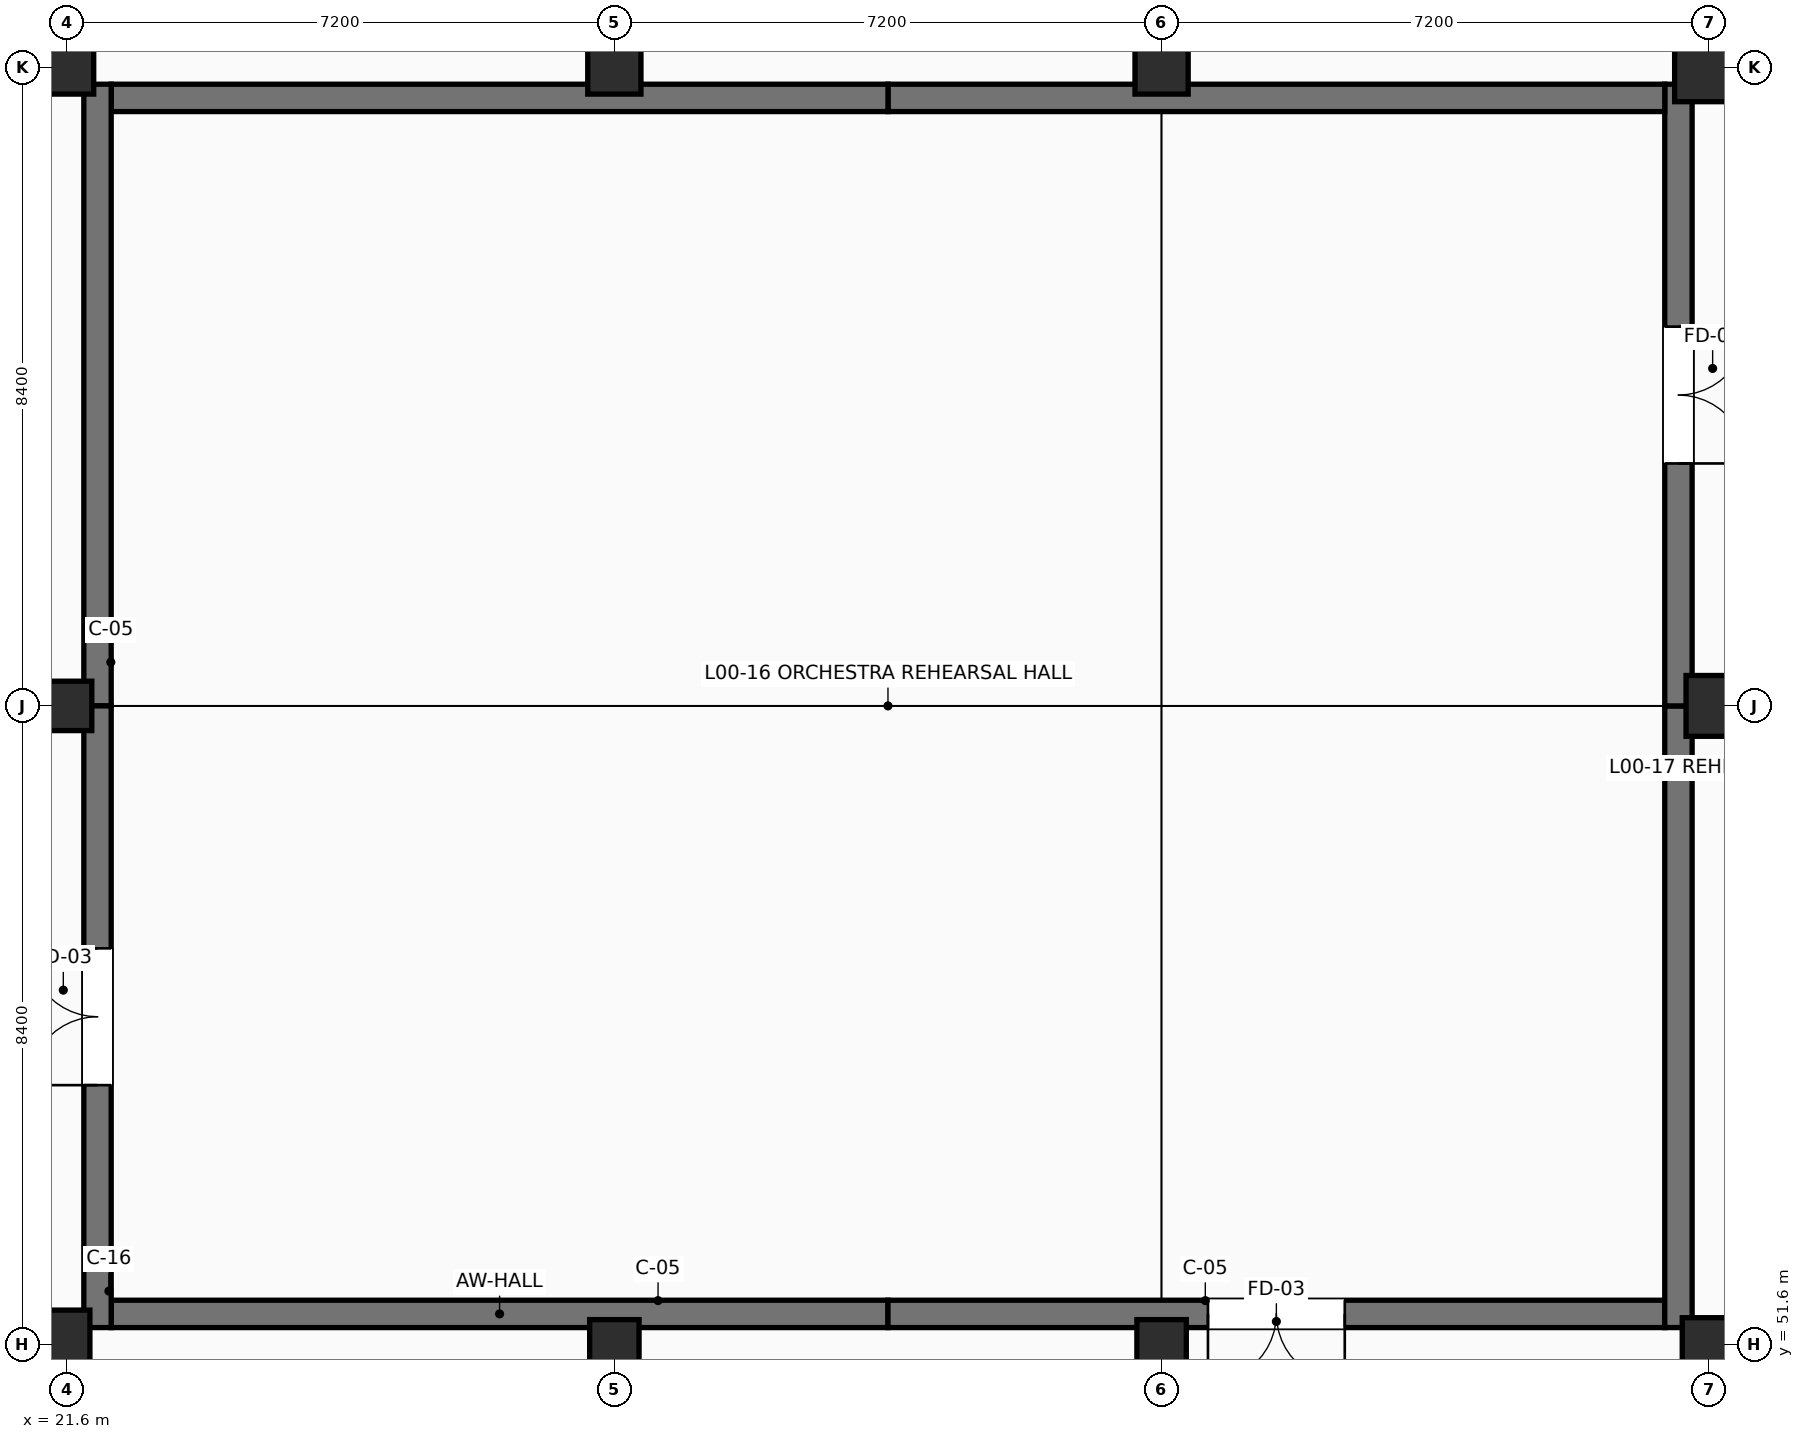
"""IFC4 building model, lengths in metres.
Left out: names, types, materials, properties, quantities, classifications, styles, units other than length and angle.
Written with IfcOpenShell. Run it as: python <this file> out.ifc"""

import sys

from ifc_helpers import new_model, si_unit, direction, frame, frame_2d, origin, origin_2d, place, context, subcontext, project, spatial, rectangle, extrude, element, fill, save


model = new_model("IFC4")
c1 = context("Model", 3, precision=1e-05, world=origin(), true_north=direction((0.0, 1.0)))
c2 = subcontext(c1, "Body", "Model", "MODEL_VIEW")
j1 = project(units=[si_unit("LENGTHUNIT", "METRE"), si_unit("PLANEANGLEUNIT", "RADIAN")], contexts=[c1])
p1 = place(None, origin())
s1 = spatial("IfcSite", under=j1, at=p1, CompositionType="ELEMENT")
p2 = place(p1, origin())
s2 = spatial("IfcBuilding", under=s1, at=p2, CompositionType="ELEMENT")
p3 = place(p2, origin())
s3 = spatial("IfcBuildingStorey", under=s2, at=p3, CompositionType="ELEMENT", Elevation=0.0)
p4 = place(p3, frame((21.6, 51.6, 0.0), z_axis=(0.0, 0.0, 1.0), x_axis=(1.0, 0.0, 0.0)))
e1 = element("IfcColumn", 1, at=p4, inside=s3, PredefinedType="COLUMN", context=c2, shape_type="SweptSolid", body=[
    extrude(rectangle(XDim=0.6, YDim=0.9, at=origin_2d()), origin(), (0.0, 0.0, 1.0), 4.8),
])
p5 = place(p3, frame((21.6, 60.0, 0.0), z_axis=(0.0, 0.0, 1.0), x_axis=(1.0, 0.0, 0.0)))
e2 = element("IfcColumn", 2, at=p5, inside=s3, PredefinedType="COLUMN", context=c2, shape_type="SweptSolid", body=[
    extrude(rectangle(XDim=0.65, YDim=0.65, at=origin_2d()), origin(), (0.0, 0.0, 1.0), 4.8),
])
p6 = place(p3, frame((21.6, 68.4, 0.0), z_axis=(0.0, 0.0, 1.0), x_axis=(1.0, 0.0, 0.0)))
e3 = element("IfcColumn", 3, at=p6, inside=s3, PredefinedType="COLUMN", context=c2, shape_type="SweptSolid", body=[
    extrude(rectangle(XDim=0.7, YDim=0.7, at=origin_2d()), origin(), (0.0, 0.0, 1.0), 4.8),
])
p7 = place(p3, frame((28.8, 51.6, 0.0), z_axis=(0.0, 0.0, 1.0), x_axis=(1.0, 0.0, 0.0)))
e4 = element("IfcColumn", 4, at=p7, inside=s3, PredefinedType="COLUMN", context=c2, shape_type="SweptSolid", body=[
    extrude(rectangle(XDim=0.65, YDim=0.65, at=origin_2d()), origin(), (0.0, 0.0, 1.0), 4.8),
])
p8 = place(p3, frame((28.8, 68.4, 0.0), z_axis=(0.0, 0.0, 1.0), x_axis=(1.0, 0.0, 0.0)))
e5 = element("IfcColumn", 5, at=p8, inside=s3, PredefinedType="COLUMN", context=c2, shape_type="SweptSolid", body=[
    extrude(rectangle(XDim=0.7, YDim=0.7, at=origin_2d()), origin(), (0.0, 0.0, 1.0), 4.8),
])
p9 = place(p3, frame((36.0, 51.6, 0.0), z_axis=(0.0, 0.0, 1.0), x_axis=(1.0, 0.0, 0.0)))
e6 = element("IfcColumn", 6, at=p9, inside=s3, PredefinedType="COLUMN", context=c2, shape_type="SweptSolid", body=[
    extrude(rectangle(XDim=0.65, YDim=0.65, at=origin_2d()), origin(), (0.0, 0.0, 1.0), 4.8),
])
for number, where, z_axis, x_axis in (
    (7, (36.0, 68.4, 0.0), (0.0, 0.0, 1.0), (1.0, 0.0, 0.0)),
    (8, (43.2, 51.6, 0.0), (0.0, 0.0, 1.0), (1.0, 0.0, 0.0)),
):
    element("IfcColumn", number, at=place(p3, frame(where, z_axis=z_axis, x_axis=x_axis)), inside=s3, PredefinedType="COLUMN", context=c2, shape_type="SweptSolid", body=[
        extrude(rectangle(XDim=0.7, YDim=0.7, at=origin_2d()), origin(), (0.0, 0.0, 1.0), 4.8),
    ])
p10 = place(p3, frame((43.2, 60.0, 0.0), z_axis=(0.0, 0.0, 1.0), x_axis=(1.0, 0.0, 0.0)))
e9 = element("IfcColumn", 9, at=p10, inside=s3, PredefinedType="COLUMN", context=c2, shape_type="SweptSolid", body=[
    extrude(rectangle(XDim=0.6, YDim=0.8, at=origin_2d()), origin(), (0.0, 0.0, 1.0), 4.8),
])
p11 = place(p3, frame((43.2, 68.4, 0.0), z_axis=(0.0, 0.0, 1.0), x_axis=(1.0, 0.0, 0.0)))
e10 = element("IfcColumn", 10, at=p11, inside=s3, PredefinedType="COLUMN", context=c2, shape_type="SweptSolid", body=[
    extrude(rectangle(XDim=0.9, YDim=0.9, at=origin_2d()), origin(), (0.0, 0.0, 1.0), 4.8),
])
p12 = place(p3, frame((22.18, 52.0, 0.0), z_axis=(0.0, 0.0, 1.0), x_axis=(1.0, 0.0, 0.0)))
e11 = element("IfcWall", 11, at=p12, inside=s3, PredefinedType="SHEAR", context=c2, shape_type="SweptSolid", body=[
    extrude(rectangle(XDim=10.22, YDim=0.36, at=frame_2d((5.11, 0.0))), origin(), (0.0, 0.0, 1.0), 4.8),
])
p13 = place(p3, frame((32.4, 52.0, 0.0), z_axis=(0.0, 0.0, 1.0), x_axis=(1.0, 0.0, 0.0)))
e12 = element("IfcWall", 12, at=p13, inside=s3, PredefinedType="SHEAR", context=c2, shape_type="SweptSolid", body=[
    extrude(rectangle(XDim=10.22, YDim=0.36, at=frame_2d((5.11, 0.0))), origin(), (0.0, 0.0, 1.0), 4.8),
])
p14 = place(p13, frame((4.21, 0.0, 0.0)))
e13 = element("IfcOpeningElement", 13, at=p14, cuts=e12, PredefinedType="OPENING", context=c2, shape_type="SweptSolid", body=[
    extrude(rectangle(XDim=1.8, YDim=2.25, at=frame_2d((0.9, 1.125))), frame((0.0, 0.19, 0.0), z_axis=(0.0, -1.0, 0.0), x_axis=(1.0, 0.0, 0.0)), (0.0, 0.0, 1.0), 0.38),
])
p15 = place(p3, frame((42.8, 51.82, 0.0), z_axis=(0.0, 0.0, 1.0), x_axis=(0.0, 1.0, 0.0)))
e14 = element("IfcWall", 14, at=p15, inside=s3, PredefinedType="SHEAR", context=c2, shape_type="SweptSolid", body=[
    extrude(rectangle(XDim=8.18, YDim=0.36, at=frame_2d((4.09, 0.0))), origin(), (0.0, 0.0, 1.0), 4.8),
])
p16 = place(p3, frame((42.8, 60.0, 0.0), z_axis=(0.0, 0.0, 1.0), x_axis=(0.0, 1.0, 0.0)))
e15 = element("IfcWall", 15, at=p16, inside=s3, PredefinedType="SHEAR", context=c2, shape_type="SweptSolid", body=[
    extrude(rectangle(XDim=8.18, YDim=0.36, at=frame_2d((4.09, 0.0))), origin(), (0.0, 0.0, 1.0), 4.8),
])
p17 = place(p16, frame((3.19, 0.0, 0.0)))
e16 = element("IfcOpeningElement", 16, at=p17, cuts=e15, PredefinedType="OPENING", context=c2, shape_type="SweptSolid", body=[
    extrude(rectangle(XDim=1.8, YDim=2.25, at=frame_2d((0.9, 1.125))), frame((0.0, 0.19, 0.0), z_axis=(0.0, -1.0, 0.0), x_axis=(1.0, 0.0, 0.0)), (0.0, 0.0, 1.0), 0.38),
])
p18 = place(p3, frame((42.62, 68.0, 0.0), z_axis=(0.0, 0.0, 1.0), x_axis=(-1.0, 0.0, 0.0)))
e17 = element("IfcWall", 17, at=p18, inside=s3, PredefinedType="SHEAR", context=c2, shape_type="SweptSolid", body=[
    extrude(rectangle(XDim=10.22, YDim=0.36, at=frame_2d((5.11, 0.0))), origin(), (0.0, 0.0, 1.0), 4.8),
])
p19 = place(p3, frame((32.4, 68.0, 0.0), z_axis=(0.0, 0.0, 1.0), x_axis=(-1.0, 0.0, 0.0)))
e18 = element("IfcWall", 18, at=p19, inside=s3, PredefinedType="SHEAR", context=c2, shape_type="SweptSolid", body=[
    extrude(rectangle(XDim=10.22, YDim=0.36, at=frame_2d((5.11, 0.0))), origin(), (0.0, 0.0, 1.0), 4.8),
])
p20 = place(p3, frame((22.0, 68.18, 0.0), z_axis=(0.0, 0.0, 1.0), x_axis=(0.0, -1.0, 0.0)))
e19 = element("IfcWall", 19, at=p20, inside=s3, PredefinedType="SHEAR", context=c2, shape_type="SweptSolid", body=[
    extrude(rectangle(XDim=8.18, YDim=0.36, at=frame_2d((4.09, 0.0))), origin(), (0.0, 0.0, 1.0), 4.8),
])
p21 = place(p3, frame((22.0, 60.0, 0.0), z_axis=(0.0, 0.0, 1.0), x_axis=(0.0, -1.0, 0.0)))
e20 = element("IfcWall", 20, at=p21, inside=s3, PredefinedType="SHEAR", context=c2, shape_type="SweptSolid", body=[
    extrude(rectangle(XDim=8.18, YDim=0.36, at=frame_2d((4.09, 0.0))), origin(), (0.0, 0.0, 1.0), 4.8),
])
p22 = place(p21, frame((3.19, 0.0, 0.0)))
e21 = element("IfcOpeningElement", 21, at=p22, cuts=e20, PredefinedType="OPENING", context=c2, shape_type="SweptSolid", body=[
    extrude(rectangle(XDim=1.8, YDim=2.25, at=frame_2d((0.9, 1.125))), frame((0.0, 0.19, 0.0), z_axis=(0.0, -1.0, 0.0), x_axis=(1.0, 0.0, 0.0)), (0.0, 0.0, 1.0), 0.38),
])
p23 = place(p14, frame((1.8, 0.0, 0.0), z_axis=(0.0, 0.0, 1.0), x_axis=(-1.0, 0.0, 0.0)))
e22 = element("IfcDoor", 22, at=p23, inside=s3, OperationType="DOUBLE_DOOR_SINGLE_SWING", PredefinedType="DOOR", context=c2, shape_type="SweptSolid", body=[
    extrude(rectangle(XDim=1.8, YDim=2.25, at=frame_2d((0.9, 1.125))), frame((0.0, 0.025, 0.0), z_axis=(0.0, -1.0, 0.0), x_axis=(1.0, 0.0, 0.0)), (0.0, 0.0, 1.0), 0.05),
])
fill(e13, e22)
p24 = place(p17, frame((1.8, 0.0, 0.0), z_axis=(0.0, 0.0, 1.0), x_axis=(-1.0, 0.0, 0.0)))
e23 = element("IfcDoor", 23, at=p24, inside=s3, OperationType="DOUBLE_DOOR_SINGLE_SWING", PredefinedType="DOOR", context=c2, shape_type="SweptSolid", body=[
    extrude(rectangle(XDim=1.8, YDim=2.25, at=frame_2d((0.9, 1.125))), frame((0.0, 0.025, 0.0), z_axis=(0.0, -1.0, 0.0), x_axis=(1.0, 0.0, 0.0)), (0.0, 0.0, 1.0), 0.05),
])
fill(e16, e23)
p25 = place(p22, frame((1.8, 0.0, 0.0), z_axis=(0.0, 0.0, 1.0), x_axis=(-1.0, 0.0, 0.0)))
e24 = element("IfcDoor", 24, at=p25, inside=s3, OperationType="DOUBLE_DOOR_SINGLE_SWING", PredefinedType="DOOR", context=c2, shape_type="SweptSolid", body=[
    extrude(rectangle(XDim=1.8, YDim=2.25, at=frame_2d((0.9, 1.125))), frame((0.0, 0.025, 0.0), z_axis=(0.0, -1.0, 0.0), x_axis=(1.0, 0.0, 0.0)), (0.0, 0.0, 1.0), 0.05),
])
fill(e21, e24)
save(model, sys.argv[1])
